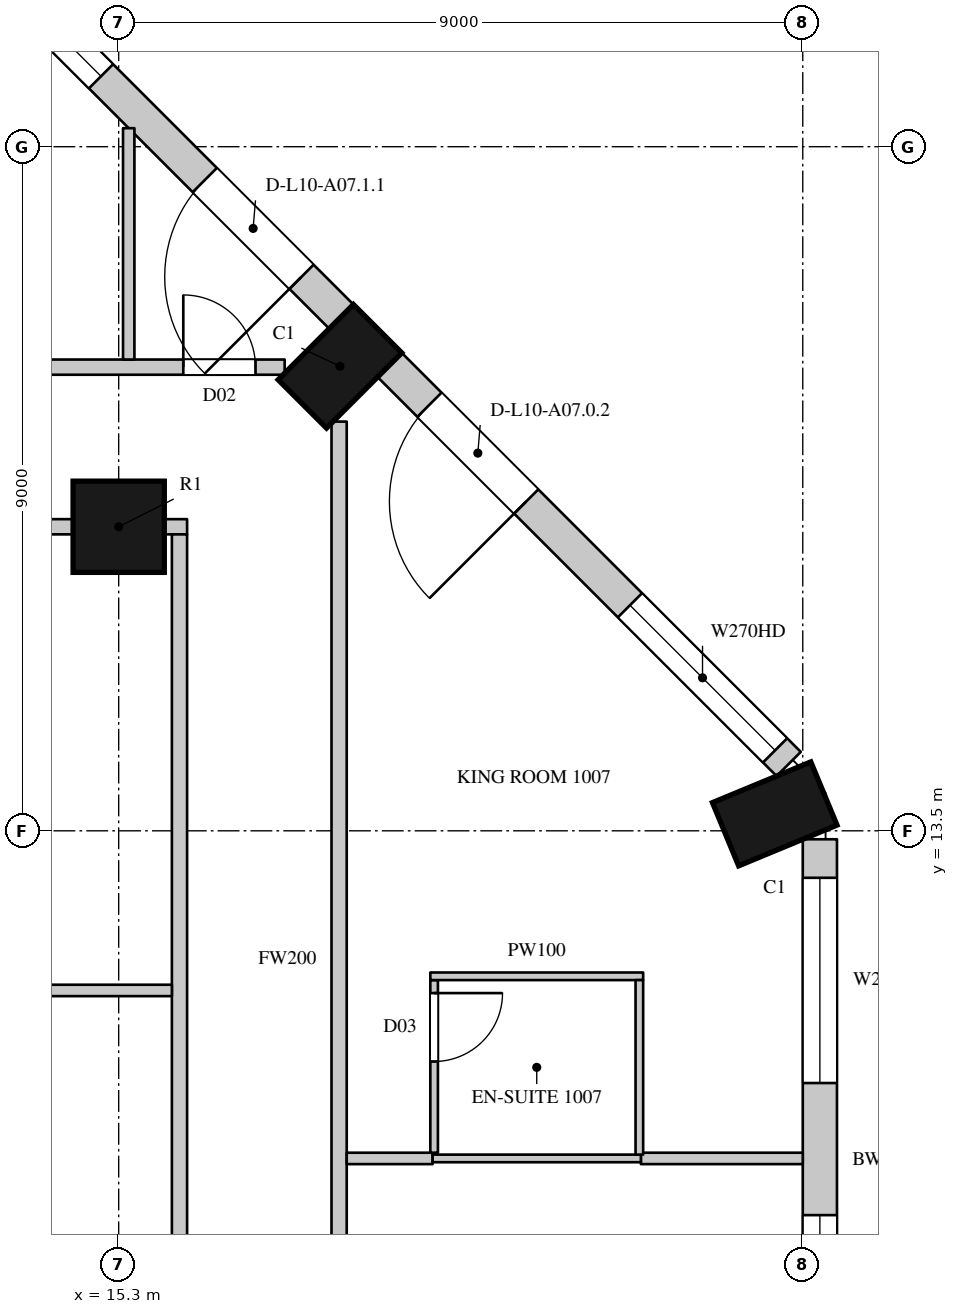
"""IFC4 building model, lengths in metres.
Left out: names, types, materials, properties, quantities, classifications, styles, units other than length and angle.
Written with IfcOpenShell. Run it as: python <this file> out.ifc"""

import sys

from ifc_helpers import new_model, si_unit, direction, frame, frame_2d, origin, origin_2d, place, context, subcontext, project, spatial, rectangle, circle, extrude, element, fill, save


model = new_model("IFC4")
c1 = context("Model", 3, precision=1e-05, world=origin(), true_north=direction((0.0, 1.0)))
c2 = subcontext(c1, "Body", "Model", "MODEL_VIEW")
j1 = project(units=[si_unit("LENGTHUNIT", "METRE"), si_unit("PLANEANGLEUNIT", "RADIAN")], contexts=[c1])
p1 = place(None, origin())
s1 = spatial("IfcSite", under=j1, at=p1, CompositionType="ELEMENT")
p2 = place(p1, origin())
s2 = spatial("IfcBuilding", under=s1, at=p2, CompositionType="ELEMENT")
p3 = place(p2, frame((0.0, 0.0, 66.3)))
s3 = spatial("IfcBuildingStorey", under=s2, at=p3, CompositionType="ELEMENT", Elevation=66.3)
for number, where, z_axis, x_axis in (
    (1, (23.931, 13.723, 0.0), (0.0, 0.0, 1.0), (-0.383, 0.924, 0.0)),
    (2, (18.211, 19.611, 0.0), (0.0, 0.0, 1.0), (-0.707, 0.707, 0.0)),
):
    element("IfcColumn", number, at=place(p3, frame(where, z_axis=z_axis, x_axis=x_axis)), inside=s3, PredefinedType="COLUMN", context=c2, shape_type="SweptSolid", body=[
        extrude(rectangle(XDim=0.9, YDim=1.4, at=origin_2d()), origin(), (0.0, 0.0, 1.0), 3.6),
    ])
p4 = place(p3, frame((15.3, 17.5, 0.0), z_axis=(0.0, 0.0, 1.0), x_axis=(1.0, 0.0, 0.0)))
e3 = element("IfcColumn", 3, at=p4, inside=s3, PredefinedType="COLUMN", context=c2, shape_type="SweptSolid", body=[
    extrude(circle(Radius=0.6, at=origin_2d()), origin(), (0.0, 0.0, 1.0), 3.6),
])
p5 = place(p3, frame((24.525, 4.95, 0.0), z_axis=(0.0, 0.0, 1.0), x_axis=(0.0, 1.0, 0.0)))
e4 = element("IfcWall", 4, at=p5, inside=s3, PredefinedType="SOLIDWALL", context=c2, shape_type="SweptSolid", body=[
    extrude(rectangle(XDim=8.439, YDim=0.45, at=frame_2d((4.219, 0.0))), origin(), (0.0, 0.0, 1.0), 3.3),
])
p6 = place(p5, frame((0.294, 0.0, 0.0)))
e5 = element("IfcOpeningElement", 5, at=p6, cuts=e4, PredefinedType="OPENING", context=c2, shape_type="SweptSolid", body=[
    extrude(rectangle(XDim=1.8, YDim=2.4, at=frame_2d((0.9, 1.2))), frame((0.0, 0.235, 0.0), z_axis=(0.0, -1.0, 0.0), x_axis=(1.0, 0.0, 0.0)), (0.0, 0.0, 1.0), 0.47),
])
p7 = place(p5, frame((2.294, 0.0, 1.05)))
e6 = element("IfcOpeningElement", 6, at=p7, cuts=e4, PredefinedType="OPENING", context=c2, shape_type="SweptSolid", body=[
    extrude(rectangle(XDim=1.2, YDim=2.0, at=frame_2d((0.6, 1.0))), frame((0.0, 0.235, 0.0), z_axis=(0.0, -1.0, 0.0), x_axis=(1.0, 0.0, 0.0)), (0.0, 0.0, 1.0), 0.47),
])
p8 = place(p5, frame((5.232, 0.0, 1.05)))
e7 = element("IfcOpeningElement", 7, at=p8, cuts=e4, PredefinedType="OPENING", context=c2, shape_type="SweptSolid", body=[
    extrude(rectangle(XDim=2.7, YDim=2.0, at=frame_2d((1.35, 1.0))), frame((0.0, 0.235, 0.0), z_axis=(0.0, -1.0, 0.0), x_axis=(1.0, 0.0, 0.0)), (0.0, 0.0, 1.0), 0.47),
])
p9 = place(p3, frame((24.115, 14.379, 0.0), z_axis=(0.0, 0.0, 1.0), x_axis=(-0.707106781187, 0.707106781187, 0.0)))
e8 = element("IfcWall", 8, at=p9, inside=s3, PredefinedType="SOLIDWALL", context=c2, shape_type="SweptSolid", body=[
    extrude(rectangle(XDim=7.424, YDim=0.45, at=frame_2d((3.712, 0.0))), origin(), (0.0, 0.0, 1.0), 3.3),
])
p10 = place(p9, frame((0.253, 0.0, 1.05)))
e9 = element("IfcOpeningElement", 9, at=p10, cuts=e8, PredefinedType="OPENING", context=c2, shape_type="SweptSolid", body=[
    extrude(rectangle(XDim=2.7, YDim=2.0, at=frame_2d((1.35, 1.0))), frame((0.0, 0.235, 0.0), z_axis=(0.0, -1.0, 0.0), x_axis=(1.0, 0.0, 0.0)), (0.0, 0.0, 1.0), 0.47),
])
p11 = place(p9, frame((4.884, 0.0, 0.0)))
e10 = element("IfcOpeningElement", 10, at=p11, cuts=e8, PredefinedType="OPENING", context=c2, shape_type="SweptSolid", body=[
    extrude(rectangle(XDim=1.8, YDim=2.4, at=frame_2d((0.9, 1.2))), frame((0.0, 0.235, 0.0), z_axis=(0.0, -1.0, 0.0), x_axis=(1.0, 0.0, 0.0)), (0.0, 0.0, 1.0), 0.47),
])
p12 = place(p3, frame((18.229, 20.265, 0.0), z_axis=(0.0, 0.0, 1.0), x_axis=(-0.707106781187, 0.707106781187, 0.0)))
e11 = element("IfcWall", 11, at=p12, inside=s3, PredefinedType="SOLIDWALL", context=c2, shape_type="SweptSolid", body=[
    extrude(rectangle(XDim=7.424, YDim=0.45, at=frame_2d((3.712, 0.0))), origin(), (0.0, 0.0, 1.0), 3.3),
])
p13 = place(p12, frame((0.74, 0.0, 0.0)))
e12 = element("IfcOpeningElement", 12, at=p13, cuts=e11, PredefinedType="OPENING", context=c2, shape_type="SweptSolid", body=[
    extrude(rectangle(XDim=1.8, YDim=2.4, at=frame_2d((0.9, 1.2))), frame((0.0, 0.235, 0.0), z_axis=(0.0, -1.0, 0.0), x_axis=(1.0, 0.0, 0.0)), (0.0, 0.0, 1.0), 0.47),
])
p14 = place(p12, frame((4.471, 0.0, 1.05)))
e13 = element("IfcOpeningElement", 13, at=p14, cuts=e11, PredefinedType="OPENING", context=c2, shape_type="SweptSolid", body=[
    extrude(rectangle(XDim=2.7, YDim=2.0, at=frame_2d((1.35, 1.0))), frame((0.0, 0.235, 0.0), z_axis=(0.0, -1.0, 0.0), x_axis=(1.0, 0.0, 0.0)), (0.0, 0.0, 1.0), 0.47),
])
p15 = place(p3, frame((23.15, 16.864, 0.0), z_axis=(0.0, 0.0, 1.0), x_axis=(-0.707106781187, 0.707106781187, 0.0)))
e14 = element("IfcWall", 14, at=p15, inside=s3, PredefinedType="SOLIDWALL", context=c2, shape_type="SweptSolid", body=[
    extrude(rectangle(XDim=1.445, YDim=0.45, at=frame_2d((0.722, 0.0))), origin(), (0.0, 0.0, 1.0), 0.6),
])
p16 = place(p3, frame((19.937, 20.078, 0.0), z_axis=(0.0, 0.0, 1.0), x_axis=(-0.707106781187, 0.707106781187, 0.0)))
e15 = element("IfcWall", 15, at=p16, inside=s3, PredefinedType="SOLIDWALL", context=c2, shape_type="SweptSolid", body=[
    extrude(rectangle(XDim=1.781, YDim=0.45, at=frame_2d((0.89, 0.0))), origin(), (0.0, 0.0, 1.0), 0.6),
])
p17 = place(p3, frame((16.486, 23.529, 0.0), z_axis=(0.0, 0.0, 1.0), x_axis=(-0.707022305137, 0.707191247145, 0.0)))
e16 = element("IfcWall", 16, at=p17, inside=s3, PredefinedType="SOLIDWALL", context=c2, shape_type="SweptSolid", body=[
    extrude(rectangle(XDim=1.445, YDim=0.45, at=frame_2d((0.723, 0.0))), origin(), (0.0, 0.0, 1.0), 0.6),
])
p18 = place(p3, frame((-20.7, 19.6, 0.0), z_axis=(0.0, 0.0, 1.0), x_axis=(1.0, 0.0, 0.0)))
e17 = element("IfcWall", 17, at=p18, inside=s3, PredefinedType="PARTITIONING", context=c2, shape_type="SweptSolid", body=[
    extrude(rectangle(XDim=38.184, YDim=0.2, at=frame_2d((19.092, 0.0))), origin(), (0.0, 0.0, 1.0), 3.3),
])
p19 = place(p18, frame((3.15, 0.0, 0.0)))
e18 = element("IfcOpeningElement", 18, at=p19, cuts=e17, PredefinedType="OPENING", context=c2, shape_type="SweptSolid", body=[
    extrude(rectangle(XDim=0.95, YDim=2.2, at=frame_2d((0.475, 1.1))), frame((0.0, 0.11, 0.0), z_axis=(0.0, -1.0, 0.0), x_axis=(1.0, 0.0, 0.0)), (0.0, 0.0, 1.0), 0.22),
])
p20 = place(p18, frame((13.9, 0.0, 0.0)))
e19 = element("IfcOpeningElement", 19, at=p20, cuts=e17, PredefinedType="OPENING", context=c2, shape_type="SweptSolid", body=[
    extrude(rectangle(XDim=0.95, YDim=2.2, at=frame_2d((0.475, 1.1))), frame((0.0, 0.11, 0.0), z_axis=(0.0, -1.0, 0.0), x_axis=(1.0, 0.0, 0.0)), (0.0, 0.0, 1.0), 0.22),
])
p21 = place(p18, frame((21.15, 0.0, 0.0)))
e20 = element("IfcOpeningElement", 20, at=p21, cuts=e17, PredefinedType="OPENING", context=c2, shape_type="SweptSolid", body=[
    extrude(rectangle(XDim=0.95, YDim=2.2, at=frame_2d((0.475, 1.1))), frame((0.0, 0.11, 0.0), z_axis=(0.0, -1.0, 0.0), x_axis=(1.0, 0.0, 0.0)), (0.0, 0.0, 1.0), 0.22),
])
p22 = place(p18, frame((31.9, 0.0, 0.0)))
e21 = element("IfcOpeningElement", 21, at=p22, cuts=e17, PredefinedType="OPENING", context=c2, shape_type="SweptSolid", body=[
    extrude(rectangle(XDim=0.95, YDim=2.2, at=frame_2d((0.475, 1.1))), frame((0.0, 0.11, 0.0), z_axis=(0.0, -1.0, 0.0), x_axis=(1.0, 0.0, 0.0)), (0.0, 0.0, 1.0), 0.22),
])
p23 = place(p18, frame((36.85, 0.0, 0.0)))
e22 = element("IfcOpeningElement", 22, at=p23, cuts=e17, PredefinedType="OPENING", context=c2, shape_type="SweptSolid", body=[
    extrude(rectangle(XDim=0.95, YDim=2.2, at=frame_2d((0.475, 1.1))), frame((0.0, 0.11, 0.0), z_axis=(0.0, -1.0, 0.0), x_axis=(1.0, 0.0, 0.0)), (0.0, 0.0, 1.0), 0.22),
])
p24 = place(p3, frame((6.9, 17.5, 0.0), z_axis=(0.0, 0.0, 1.0), x_axis=(1.0, 0.0, 0.0)))
e23 = element("IfcWall", 23, at=p24, inside=s3, PredefinedType="PARTITIONING", context=c2, shape_type="SweptSolid", body=[
    extrude(rectangle(XDim=7.8, YDim=0.2, at=frame_2d((3.9, 0.0))), origin(), (0.0, 0.0, 1.0), 2.75),
])
p25 = place(p24, frame((3.45, 0.0, 0.0)))
e24 = element("IfcOpeningElement", 24, at=p25, cuts=e23, PredefinedType="OPENING", context=c2, shape_type="SweptSolid", body=[
    extrude(rectangle(XDim=0.95, YDim=2.2, at=frame_2d((0.475, 1.1))), frame((0.0, 0.11, 0.0), z_axis=(0.0, -1.0, 0.0), x_axis=(1.0, 0.0, 0.0)), (0.0, 0.0, 1.0), 0.22),
])
p26 = place(p3, frame((15.9, 17.5, 0.0), z_axis=(0.0, 0.0, 1.0), x_axis=(1.0, 0.0, 0.0)))
e25 = element("IfcWall", 25, at=p26, inside=s3, PredefinedType="PARTITIONING", context=c2, shape_type="SweptSolid", body=[
    extrude(rectangle(XDim=0.3, YDim=0.2, at=frame_2d((0.15, 0.0))), origin(), (0.0, 0.0, 1.0), 3.3),
])
p27 = place(p3, frame((16.1, 6.825, 0.0), z_axis=(0.0, 0.0, 1.0), x_axis=(0.0, 1.0, 0.0)))
e26 = element("IfcWall", 26, at=p27, inside=s3, PredefinedType="PARTITIONING", context=c2, shape_type="SweptSolid", body=[
    extrude(rectangle(XDim=10.575, YDim=0.2, at=frame_2d((5.288, 0.0))), origin(), (0.0, 0.0, 1.0), 3.3),
])
p28 = place(p3, frame((18.2, 4.75, 0.0), z_axis=(0.0, 0.0, 1.0), x_axis=(0.0, 1.0, 0.0)))
e27 = element("IfcWall", 27, at=p28, inside=s3, PredefinedType="PARTITIONING", context=c2, shape_type="SweptSolid", body=[
    extrude(rectangle(XDim=14.134, YDim=0.2, at=frame_2d((7.067, 0.0))), origin(), (0.0, 0.0, 1.0), 3.3),
])
p29 = place(p28, frame((1.7, 0.0, 0.0)))
e28 = element("IfcOpeningElement", 28, at=p29, cuts=e27, PredefinedType="OPENING", context=c2, shape_type="SweptSolid", body=[
    extrude(rectangle(XDim=0.9, YDim=2.2, at=frame_2d((0.45, 1.1))), frame((0.0, 0.11, 0.0), z_axis=(0.0, -1.0, 0.0), x_axis=(1.0, 0.0, 0.0)), (0.0, 0.0, 1.0), 0.22),
])
p30 = place(p3, frame((10.4, 11.4, 0.0), z_axis=(0.0, 0.0, 1.0), x_axis=(1.0, 0.0, 0.0)))
e29 = element("IfcWall", 29, at=p30, inside=s3, PredefinedType="PARTITIONING", context=c2, shape_type="SweptSolid", body=[
    extrude(rectangle(XDim=5.6, YDim=0.15, at=frame_2d((2.8, 0.0))), origin(), (0.0, 0.0, 1.0), 3.3),
])
p31 = place(p3, frame((15.432, 19.7, 0.0), z_axis=(0.0, 0.0, 1.0), x_axis=(0.0, 1.0, 0.0)))
e30 = element("IfcWall", 30, at=p31, inside=s3, PredefinedType="PARTITIONING", context=c2, shape_type="SweptSolid", body=[
    extrude(rectangle(XDim=3.044, YDim=0.15, at=frame_2d((1.522, 0.0))), origin(), (0.0, 0.0, 1.0), 3.3),
])
p32 = place(p3, frame((18.3, 9.19, 0.0), z_axis=(0.0, 0.0, 1.0), x_axis=(1.0, 0.0, 0.0)))
e31 = element("IfcWall", 31, at=p32, inside=s3, PredefinedType="PARTITIONING", context=c2, shape_type="SweptSolid", body=[
    extrude(rectangle(XDim=1.13, YDim=0.15, at=frame_2d((0.565, 0.0))), origin(), (0.0, 0.0, 1.0), 2.65),
])
p33 = place(p3, frame((22.17, 9.19, 0.0), z_axis=(0.0, 0.0, 1.0), x_axis=(1.0, 0.0, 0.0)))
e32 = element("IfcWall", 32, at=p33, inside=s3, PredefinedType="PARTITIONING", context=c2, shape_type="SweptSolid", body=[
    extrude(rectangle(XDim=2.13, YDim=0.15, at=frame_2d((1.065, 0.0))), origin(), (0.0, 0.0, 1.0), 2.65),
])
p34 = place(p3, frame((19.43, 9.19, 0.0), z_axis=(0.0, 0.0, 1.0), x_axis=(1.0, 0.0, 0.0)))
e33 = element("IfcWall", 33, at=p34, inside=s3, PredefinedType="PARTITIONING", context=c2, shape_type="SweptSolid", body=[
    extrude(rectangle(XDim=2.74, YDim=0.1, at=frame_2d((1.37, 0.0))), origin(), (0.0, 0.0, 1.0), 2.65),
])
p35 = place(p3, frame((19.45, 9.265, 0.0), z_axis=(0.0, 0.0, 1.0), x_axis=(0.0, 1.0, 0.0)))
e34 = element("IfcWall", 34, at=p35, inside=s3, PredefinedType="PARTITIONING", context=c2, shape_type="SweptSolid", body=[
    extrude(rectangle(XDim=2.271, YDim=0.1, at=frame_2d((1.135, 0.0))), origin(), (0.0, 0.0, 1.0), 3.3),
])
p36 = place(p35, frame((1.2, 0.0, 0.0)))
e35 = element("IfcOpeningElement", 35, at=p36, cuts=e34, PredefinedType="OPENING", context=c2, shape_type="SweptSolid", body=[
    extrude(rectangle(XDim=0.9, YDim=2.2, at=frame_2d((0.45, 1.1))), frame((0.0, 0.06, 0.0), z_axis=(0.0, -1.0, 0.0), x_axis=(1.0, 0.0, 0.0)), (0.0, 0.0, 1.0), 0.12),
])
p37 = place(p3, frame((19.4, 11.586, 0.0), z_axis=(0.0, 0.0, 1.0), x_axis=(1.0, 0.0, 0.0)))
e36 = element("IfcWall", 36, at=p37, inside=s3, PredefinedType="PARTITIONING", context=c2, shape_type="SweptSolid", body=[
    extrude(rectangle(XDim=2.8, YDim=0.1, at=frame_2d((1.4, 0.0))), origin(), (0.0, 0.0, 1.0), 3.3),
])
p38 = place(p3, frame((22.15, 9.24, 0.0), z_axis=(0.0, 0.0, 1.0), x_axis=(0.0, 1.0, 0.0)))
e37 = element("IfcWall", 37, at=p38, inside=s3, PredefinedType="PARTITIONING", context=c2, shape_type="SweptSolid", body=[
    extrude(rectangle(XDim=2.296, YDim=0.1, at=frame_2d((1.148, 0.0))), origin(), (0.0, 0.0, 1.0), 3.3),
])
p39 = place(p7, origin())
e38 = element("IfcWindow", 38, at=p39, inside=s3, PartitioningType="SINGLE_PANEL", PredefinedType="WINDOW", context=c2, shape_type="SweptSolid", body=[
    extrude(rectangle(XDim=1.2, YDim=2.0, at=frame_2d((0.6, 1.0))), frame((0.0, 0.135, 0.0), z_axis=(0.0, -1.0, 0.0), x_axis=(1.0, 0.0, 0.0)), (0.0, 0.0, 1.0), 0.06),
])
fill(e6, e38)
p40 = place(p8, origin())
e39 = element("IfcWindow", 39, at=p40, inside=s3, PartitioningType="SINGLE_PANEL", PredefinedType="WINDOW", context=c2, shape_type="SweptSolid", body=[
    extrude(rectangle(XDim=2.7, YDim=2.0, at=frame_2d((1.35, 1.0))), frame((0.0, 0.135, 0.0), z_axis=(0.0, -1.0, 0.0), x_axis=(1.0, 0.0, 0.0)), (0.0, 0.0, 1.0), 0.06),
])
fill(e7, e39)
p41 = place(p10, origin())
e40 = element("IfcWindow", 40, at=p41, inside=s3, PartitioningType="SINGLE_PANEL", PredefinedType="WINDOW", context=c2, shape_type="SweptSolid", body=[
    extrude(rectangle(XDim=2.7, YDim=2.0, at=frame_2d((1.35, 1.0))), frame((0.0, 0.135, 0.0), z_axis=(0.0, -1.0, 0.0), x_axis=(1.0, 0.0, 0.0)), (0.0, 0.0, 1.0), 0.06),
])
fill(e9, e40)
p42 = place(p11, origin())
e41 = element("IfcDoor", 41, at=p42, inside=s3, OperationType="SLIDING_TO_LEFT", PredefinedType="DOOR", context=c2, shape_type="SweptSolid", body=[
    extrude(rectangle(XDim=1.8, YDim=2.4, at=frame_2d((0.9, 1.2))), frame((0.0, 0.13, 0.0), z_axis=(0.0, -1.0, 0.0), x_axis=(1.0, 0.0, 0.0)), (0.0, 0.0, 1.0), 0.05),
])
fill(e10, e41)
p43 = place(p13, origin())
e42 = element("IfcDoor", 42, at=p43, inside=s3, OperationType="SLIDING_TO_LEFT", PredefinedType="DOOR", context=c2, shape_type="SweptSolid", body=[
    extrude(rectangle(XDim=1.8, YDim=2.4, at=frame_2d((0.9, 1.2))), frame((0.0, 0.13, 0.0), z_axis=(0.0, -1.0, 0.0), x_axis=(1.0, 0.0, 0.0)), (0.0, 0.0, 1.0), 0.05),
])
fill(e12, e42)
p44 = place(p14, origin())
e43 = element("IfcWindow", 43, at=p44, inside=s3, PartitioningType="SINGLE_PANEL", PredefinedType="WINDOW", context=c2, shape_type="SweptSolid", body=[
    extrude(rectangle(XDim=2.7, YDim=2.0, at=frame_2d((1.35, 1.0))), frame((0.0, 0.135, 0.0), z_axis=(0.0, -1.0, 0.0), x_axis=(1.0, 0.0, 0.0)), (0.0, 0.0, 1.0), 0.06),
])
fill(e13, e43)
p45 = place(p23, origin())
e44 = element("IfcDoor", 44, at=p45, inside=s3, OperationType="SINGLE_SWING_LEFT", PredefinedType="DOOR", context=c2, shape_type="SweptSolid", body=[
    extrude(rectangle(XDim=0.95, YDim=2.2, at=frame_2d((0.475, 1.1))), frame((0.0, 0.025, 0.0), z_axis=(0.0, -1.0, 0.0), x_axis=(1.0, 0.0, 0.0)), (0.0, 0.0, 1.0), 0.05),
])
fill(e22, e44)
p46 = place(p36, origin())
e45 = element("IfcDoor", 45, at=p46, inside=s3, OperationType="SINGLE_SWING_LEFT", PredefinedType="DOOR", context=c2, shape_type="SweptSolid", body=[
    extrude(rectangle(XDim=0.9, YDim=2.2, at=frame_2d((0.45, 1.1))), frame((0.0, 0.025, 0.0), z_axis=(0.0, -1.0, 0.0), x_axis=(1.0, 0.0, 0.0)), (0.0, 0.0, 1.0), 0.05),
])
fill(e35, e45)
save(model, sys.argv[1])
